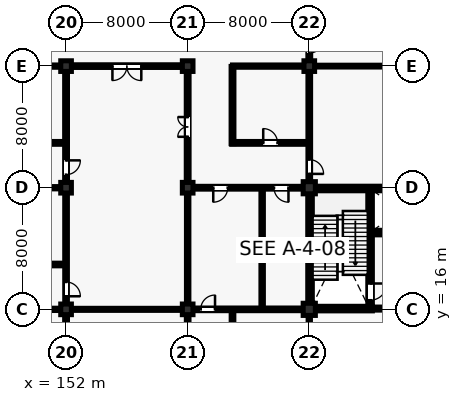
"""IFC4 building model, lengths in metres.
Left out: names, types, materials, properties, quantities, classifications, styles, units other than length and angle.
Written with IfcOpenShell. Run it as: python <this file> out.ifc"""

import sys

from ifc_helpers import new_model, si_unit, direction, frame, frame_2d, origin, origin_2d, place, context, subcontext, project, spatial, rectangle, extrude, element, fill, save


model = new_model("IFC4")
c1 = context("Model", 3, precision=1e-05, world=origin(), true_north=direction((0.0, 1.0)))
c2 = subcontext(c1, "Body", "Model", "MODEL_VIEW")
j1 = project(units=[si_unit("LENGTHUNIT", "METRE"), si_unit("PLANEANGLEUNIT", "RADIAN")], contexts=[c1])
p1 = place(None, origin())
s1 = spatial("IfcSite", under=j1, at=p1, CompositionType="ELEMENT")
p2 = place(p1, origin())
s2 = spatial("IfcBuilding", under=s1, at=p2, CompositionType="ELEMENT")
p3 = place(p2, origin())
s3 = spatial("IfcBuildingStorey", under=s2, at=p3, CompositionType="ELEMENT", Elevation=0.0)
for number, where, z_axis, x_axis in (
    (1, (152.0, 16.0, 0.0), (0.0, 0.0, 1.0), (1.0, 0.0, 0.0)),
    (2, (152.0, 24.0, 0.0), (0.0, 0.0, 1.0), (1.0, 0.0, 0.0)),
    (3, (152.0, 32.0, 0.0), (0.0, 0.0, 1.0), (1.0, 0.0, 0.0)),
    (4, (160.0, 16.0, 0.0), (0.0, 0.0, 1.0), (1.0, 0.0, 0.0)),
    (5, (160.0, 24.0, 0.0), (0.0, 0.0, 1.0), (1.0, 0.0, 0.0)),
    (6, (160.0, 32.0, 0.0), (0.0, 0.0, 1.0), (1.0, 0.0, 0.0)),
):
    element("IfcColumn", number, at=place(p3, frame(where, z_axis=z_axis, x_axis=x_axis)), inside=s3, PredefinedType="COLUMN", context=c2, shape_type="SweptSolid", body=[
        extrude(rectangle(XDim=0.7, YDim=0.7, at=origin_2d()), origin(), (0.0, 0.0, 1.0), 5.28),
    ])
for number, where, z_axis, x_axis in (
    (7, (168.0, 16.0, 0.0), (0.0, 0.0, 1.0), (1.0, 0.0, 0.0)),
    (8, (168.0, 24.0, 0.0), (0.0, 0.0, 1.0), (1.0, 0.0, 0.0)),
):
    element("IfcColumn", number, at=place(p3, frame(where, z_axis=z_axis, x_axis=x_axis)), inside=s3, PredefinedType="COLUMN", context=c2, shape_type="SweptSolid", body=[
        extrude(rectangle(XDim=0.8, YDim=0.8, at=origin_2d()), origin(), (0.0, 0.0, 1.0), 5.28),
    ])
p4 = place(p3, frame((168.0, 32.0, 0.0), z_axis=(0.0, 0.0, 1.0), x_axis=(1.0, 0.0, 0.0)))
e9 = element("IfcColumn", 9, at=p4, inside=s3, PredefinedType="COLUMN", context=c2, shape_type="SweptSolid", body=[
    extrude(rectangle(XDim=0.7, YDim=0.7, at=origin_2d()), origin(), (0.0, 0.0, 1.0), 5.28),
])
for number, where, z_axis, x_axis in (
    (10, (168.05, 16.29, 0.0), (0.0, 0.0, 1.0), (0.0, 1.0, 0.0)),
    (11, (168.29, 23.95, 0.0), (0.0, 0.0, 1.0), (1.0, 0.0, 0.0)),
):
    element("IfcWall", number, at=place(p3, frame(where, z_axis=z_axis, x_axis=x_axis)), inside=s3, PredefinedType="SHEAR", context=c2, shape_type="SweptSolid", body=[
        extrude(rectangle(XDim=7.42, YDim=0.3, at=frame_2d((3.71, 0.0))), origin(), (0.0, 0.0, 1.0), 5.035),
    ])
p5 = place(p3, frame((168.29, 16.05, 0.0), z_axis=(0.0, 0.0, 1.0), x_axis=(1.0, 0.0, 0.0)))
e12 = element("IfcWall", 12, at=p5, inside=s3, PredefinedType="SHEAR", context=c2, shape_type="SweptSolid", body=[
    extrude(rectangle(XDim=3.86, YDim=0.3, at=frame_2d((1.93, 0.0))), origin(), (0.0, 0.0, 1.0), 5.035),
])
p6 = place(p3, frame((172.0, 16.05, 0.0), z_axis=(0.0, 0.0, 1.0), x_axis=(0.0, 1.0, 0.0)))
e13 = element("IfcWall", 13, at=p6, inside=s3, PredefinedType="SHEAR", context=c2, shape_type="SweptSolid", body=[
    extrude(rectangle(XDim=7.9, YDim=0.3, at=frame_2d((3.95, 0.0))), origin(), (0.0, 0.0, 1.0), 5.035),
])
p7 = place(p6, frame((0.55, 0.0, 0.0)))
e14 = element("IfcOpeningElement", 14, at=p7, cuts=e13, PredefinedType="OPENING", context=c2, shape_type="SweptSolid", body=[
    extrude(rectangle(XDim=1.1, YDim=2.15, at=frame_2d((0.55, 1.075))), frame((0.0, 0.16, 0.0), z_axis=(0.0, -1.0, 0.0), x_axis=(1.0, 0.0, 0.0)), (0.0, 0.0, 1.0), 0.32),
])
p8 = place(p3, frame((172.0, 21.05, 0.0), z_axis=(0.0, 0.0, 1.0), x_axis=(1.0, 0.0, 0.0)))
e15 = element("IfcWall", 15, at=p8, inside=s3, PredefinedType="SHEAR", context=c2, shape_type="SweptSolid", body=[
    extrude(rectangle(XDim=3.95, YDim=0.3, at=frame_2d((1.975, 0.0))), origin(), (0.0, 0.0, 1.0), 5.035),
])
p9 = place(p8, frame((1.425, 0.0, 0.0)))
e16 = element("IfcOpeningElement", 16, at=p9, cuts=e15, PredefinedType="OPENING", context=c2, shape_type="SweptSolid", body=[
    extrude(rectangle(XDim=1.1, YDim=2.2, at=frame_2d((0.55, 1.1))), frame((0.0, 0.16, 0.0), z_axis=(0.0, -1.0, 0.0), x_axis=(1.0, 0.0, 0.0)), (0.0, 0.0, 1.0), 0.32),
])
p10 = place(p3, frame((172.0, 16.05, 0.0), z_axis=(0.0, 0.0, 1.0), x_axis=(1.0, 0.0, 0.0)))
e17 = element("IfcWall", 17, at=p10, inside=s3, PredefinedType="PARTITIONING", context=c2, shape_type="SweptSolid", body=[
    extrude(rectangle(XDim=3.61, YDim=0.2, at=frame_2d((1.805, 0.0))), origin(), (0.0, 0.0, 1.0), 4.404),
])
p11 = place(p10, frame((1.205, 0.0, 0.0)))
e18 = element("IfcOpeningElement", 18, at=p11, cuts=e17, PredefinedType="OPENING", context=c2, shape_type="SweptSolid", body=[
    extrude(rectangle(XDim=1.2, YDim=2.15, at=frame_2d((0.6, 1.075))), frame((0.0, 0.11, 0.0), z_axis=(0.0, -1.0, 0.0), x_axis=(1.0, 0.0, 0.0)), (0.0, 0.0, 1.0), 0.22),
])
p12 = place(p3, frame((146.95, 16.0, 0.0), z_axis=(0.0, 0.0, 1.0), x_axis=(1.0, 0.0, 0.0)))
e19 = element("IfcWall", 19, at=p12, inside=s3, PredefinedType="PARTITIONING", context=c2, shape_type="SweptSolid", body=[
    extrude(rectangle(XDim=4.69, YDim=0.15, at=frame_2d((2.345, 0.0))), origin(), (0.0, 0.0, 1.0), 4.603),
])
p13 = place(p3, frame((146.9, 18.95, 0.0), z_axis=(0.0, 0.0, 1.0), x_axis=(1.0, 0.0, 0.0)))
e20 = element("IfcWall", 20, at=p13, inside=s3, PredefinedType="PARTITIONING", context=c2, shape_type="SweptSolid", body=[
    extrude(rectangle(XDim=5.08, YDim=0.175, at=frame_2d((2.54, 0.0))), origin(), (0.0, 0.0, 1.0), 5.025),
])
p14 = place(p13, frame((1.915, 0.0, 0.0)))
e21 = element("IfcOpeningElement", 21, at=p14, cuts=e20, PredefinedType="OPENING", context=c2, shape_type="SweptSolid", body=[
    extrude(rectangle(XDim=1.25, YDim=2.18, at=frame_2d((0.625, 1.09))), frame((0.0, 0.097, 0.0), z_axis=(0.0, -1.0, 0.0), x_axis=(1.0, 0.0, 0.0)), (0.0, 0.0, 1.0), 0.195),
])
p15 = place(p3, frame((146.95, 24.0, 0.0), z_axis=(0.0, 0.0, 1.0), x_axis=(1.0, 0.0, 0.0)))
e22 = element("IfcWall", 22, at=p15, inside=s3, PredefinedType="PARTITIONING", context=c2, shape_type="SweptSolid", body=[
    extrude(rectangle(XDim=4.69, YDim=0.15, at=frame_2d((2.345, 0.0))), origin(), (0.0, 0.0, 1.0), 5.025),
])
p16 = place(p3, frame((146.9, 26.95, 0.0), z_axis=(0.0, 0.0, 1.0), x_axis=(1.0, 0.0, 0.0)))
e23 = element("IfcWall", 23, at=p16, inside=s3, PredefinedType="PARTITIONING", context=c2, shape_type="SweptSolid", body=[
    extrude(rectangle(XDim=5.08, YDim=0.185, at=frame_2d((2.54, 0.0))), origin(), (0.0, 0.0, 1.0), 5.025),
])
p17 = place(p16, frame((2.07, 0.0, 0.0)))
e24 = element("IfcOpeningElement", 24, at=p17, cuts=e23, PredefinedType="OPENING", context=c2, shape_type="SweptSolid", body=[
    extrude(rectangle(XDim=0.94, YDim=2.12, at=frame_2d((0.47, 1.06))), frame((0.0, 0.103, 0.0), z_axis=(0.0, -1.0, 0.0), x_axis=(1.0, 0.0, 0.0)), (0.0, 0.0, 1.0), 0.205),
])
p18 = place(p3, frame((146.95, 32.0, 0.0), z_axis=(0.0, 0.0, 1.0), x_axis=(1.0, 0.0, 0.0)))
e25 = element("IfcWall", 25, at=p18, inside=s3, PredefinedType="PARTITIONING", context=c2, shape_type="SweptSolid", body=[
    extrude(rectangle(XDim=4.69, YDim=0.15, at=frame_2d((2.345, 0.0))), origin(), (0.0, 0.0, 1.0), 4.607),
])
p19 = place(p3, frame((162.95, 10.9, 0.0), z_axis=(0.0, 0.0, 1.0), x_axis=(0.0, 1.0, 0.0)))
e26 = element("IfcWall", 26, at=p19, inside=s3, PredefinedType="PARTITIONING", context=c2, shape_type="SweptSolid", body=[
    extrude(rectangle(XDim=5.08, YDim=0.175, at=frame_2d((2.54, 0.0))), origin(), (0.0, 0.0, 1.0), 4.336),
])
p20 = place(p3, frame((168.0, 10.95, 0.0), z_axis=(0.0, 0.0, 1.0), x_axis=(0.0, 1.0, 0.0)))
e27 = element("IfcWall", 27, at=p20, inside=s3, PredefinedType="PARTITIONING", context=c2, shape_type="SweptSolid", body=[
    extrude(rectangle(XDim=4.64, YDim=0.15, at=frame_2d((2.32, 0.0))), origin(), (0.0, 0.0, 1.0), 4.404),
])
p21 = place(p3, frame((162.9, 26.95, 0.0), z_axis=(0.0, 0.0, 1.0), x_axis=(1.0, 0.0, 0.0)))
e28 = element("IfcWall", 28, at=p21, inside=s3, PredefinedType="PARTITIONING", context=c2, shape_type="SweptSolid", body=[
    extrude(rectangle(XDim=5.08, YDim=0.185, at=frame_2d((2.54, 0.0))), origin(), (0.0, 0.0, 1.0), 4.403),
])
p22 = place(p21, frame((2.07, 0.0, 0.0)))
e29 = element("IfcOpeningElement", 29, at=p22, cuts=e28, PredefinedType="OPENING", context=c2, shape_type="SweptSolid", body=[
    extrude(rectangle(XDim=0.94, YDim=2.12, at=frame_2d((0.47, 1.06))), frame((0.0, 0.103, 0.0), z_axis=(0.0, -1.0, 0.0), x_axis=(1.0, 0.0, 0.0)), (0.0, 0.0, 1.0), 0.205),
])
p23 = place(p3, frame((162.95, 26.9, 0.0), z_axis=(0.0, 0.0, 1.0), x_axis=(0.0, 1.0, 0.0)))
e30 = element("IfcWall", 30, at=p23, inside=s3, PredefinedType="PARTITIONING", context=c2, shape_type="SweptSolid", body=[
    extrude(rectangle(XDim=5.08, YDim=0.185, at=frame_2d((2.54, 0.0))), origin(), (0.0, 0.0, 1.0), 4.327),
])
p24 = place(p3, frame((162.95, 32.0, 0.0), z_axis=(0.0, 0.0, 1.0), x_axis=(1.0, 0.0, 0.0)))
e31 = element("IfcWall", 31, at=p24, inside=s3, PredefinedType="PARTITIONING", context=c2, shape_type="SweptSolid", body=[
    extrude(rectangle(XDim=4.69, YDim=0.15, at=frame_2d((2.345, 0.0))), origin(), (0.0, 0.0, 1.0), 4.327),
])
p25 = place(p3, frame((152.0, 8.34, 0.0), z_axis=(0.0, 0.0, 1.0), x_axis=(0.0, 1.0, 0.0)))
e32 = element("IfcWall", 32, at=p25, inside=s3, PredefinedType="PARTITIONING", context=c2, shape_type="SweptSolid", body=[
    extrude(rectangle(XDim=7.32, YDim=0.185, at=frame_2d((3.66, 0.0))), origin(), (0.0, 0.0, 1.0), 4.403),
])
p26 = place(p25, frame((0.52, 0.0, 0.0)))
e33 = element("IfcOpeningElement", 33, at=p26, cuts=e32, PredefinedType="OPENING", context=c2, shape_type="SweptSolid", body=[
    extrude(rectangle(XDim=0.94, YDim=2.12, at=frame_2d((0.47, 1.06))), frame((0.0, 0.103, 0.0), z_axis=(0.0, -1.0, 0.0), x_axis=(1.0, 0.0, 0.0)), (0.0, 0.0, 1.0), 0.205),
])
p27 = place(p3, frame((152.0, 16.34, 0.0), z_axis=(0.0, 0.0, 1.0), x_axis=(0.0, 1.0, 0.0)))
e34 = element("IfcWall", 34, at=p27, inside=s3, PredefinedType="PARTITIONING", context=c2, shape_type="SweptSolid", body=[
    extrude(rectangle(XDim=7.32, YDim=0.175, at=frame_2d((3.66, 0.0))), origin(), (0.0, 0.0, 1.0), 5.025),
])
p28 = place(p27, frame((0.52, 0.0, 0.0)))
e35 = element("IfcOpeningElement", 35, at=p28, cuts=e34, PredefinedType="OPENING", context=c2, shape_type="SweptSolid", body=[
    extrude(rectangle(XDim=0.94, YDim=2.12, at=frame_2d((0.47, 1.06))), frame((0.0, 0.097, 0.0), z_axis=(0.0, -1.0, 0.0), x_axis=(1.0, 0.0, 0.0)), (0.0, 0.0, 1.0), 0.195),
])
p29 = place(p3, frame((152.0, 24.34, 0.0), z_axis=(0.0, 0.0, 1.0), x_axis=(0.0, 1.0, 0.0)))
e36 = element("IfcWall", 36, at=p29, inside=s3, PredefinedType="PARTITIONING", context=c2, shape_type="SweptSolid", body=[
    extrude(rectangle(XDim=7.32, YDim=0.185, at=frame_2d((3.66, 0.0))), origin(), (0.0, 0.0, 1.0), 5.025),
])
p30 = place(p29, frame((0.52, 0.0, 0.0)))
e37 = element("IfcOpeningElement", 37, at=p30, cuts=e36, PredefinedType="OPENING", context=c2, shape_type="SweptSolid", body=[
    extrude(rectangle(XDim=0.94, YDim=2.12, at=frame_2d((0.47, 1.06))), frame((0.0, 0.103, 0.0), z_axis=(0.0, -1.0, 0.0), x_axis=(1.0, 0.0, 0.0)), (0.0, 0.0, 1.0), 0.205),
])
p31 = place(p3, frame((160.0, 8.34, 0.0), z_axis=(0.0, 0.0, 1.0), x_axis=(0.0, 1.0, 0.0)))
e38 = element("IfcWall", 38, at=p31, inside=s3, PredefinedType="PARTITIONING", context=c2, shape_type="SweptSolid", body=[
    extrude(rectangle(XDim=7.32, YDim=0.175, at=frame_2d((3.66, 0.0))), origin(), (0.0, 0.0, 1.0), 4.412),
])
p32 = place(p3, frame((152.34, 16.0, 0.0), z_axis=(0.0, 0.0, 1.0), x_axis=(1.0, 0.0, 0.0)))
e39 = element("IfcWall", 39, at=p32, inside=s3, PredefinedType="PARTITIONING", context=c2, shape_type="SweptSolid", body=[
    extrude(rectangle(XDim=7.32, YDim=0.135, at=frame_2d((3.66, 0.0))), origin(), (0.0, 0.0, 1.0), 4.667),
])
p33 = place(p3, frame((160.0, 16.34, 0.0), z_axis=(0.0, 0.0, 1.0), x_axis=(0.0, 1.0, 0.0)))
e40 = element("IfcWall", 40, at=p33, inside=s3, PredefinedType="PARTITIONING", context=c2, shape_type="SweptSolid", body=[
    extrude(rectangle(XDim=7.32, YDim=0.16, at=frame_2d((3.66, 0.0))), origin(), (0.0, 0.0, 1.0), 4.607),
])
p34 = place(p3, frame((160.0, 24.34, 0.0), z_axis=(0.0, 0.0, 1.0), x_axis=(0.0, 1.0, 0.0)))
e41 = element("IfcWall", 41, at=p34, inside=s3, PredefinedType="PARTITIONING", context=c2, shape_type="SweptSolid", body=[
    extrude(rectangle(XDim=7.32, YDim=0.185, at=frame_2d((3.66, 0.0))), origin(), (0.0, 0.0, 1.0), 4.67),
])
p35 = place(p34, frame((3.01, 0.0, 0.0)))
e42 = element("IfcOpeningElement", 42, at=p35, cuts=e41, PredefinedType="OPENING", context=c2, shape_type="SweptSolid", body=[
    extrude(rectangle(XDim=1.3, YDim=2.2, at=frame_2d((0.65, 1.1))), frame((0.0, 0.103, 0.0), z_axis=(0.0, -1.0, 0.0), x_axis=(1.0, 0.0, 0.0)), (0.0, 0.0, 1.0), 0.205),
])
p36 = place(p3, frame((152.34, 32.0, 0.0), z_axis=(0.0, 0.0, 1.0), x_axis=(1.0, 0.0, 0.0)))
e43 = element("IfcWall", 43, at=p36, inside=s3, PredefinedType="PARTITIONING", context=c2, shape_type="SweptSolid", body=[
    extrude(rectangle(XDim=7.32, YDim=0.175, at=frame_2d((3.66, 0.0))), origin(), (0.0, 0.0, 1.0), 4.67),
])
p37 = place(p36, frame((2.71, 0.0, 0.0)))
e44 = element("IfcOpeningElement", 44, at=p37, cuts=e43, PredefinedType="OPENING", context=c2, shape_type="SweptSolid", body=[
    extrude(rectangle(XDim=1.9, YDim=2.38, at=frame_2d((0.95, 1.19))), frame((0.0, 0.097, 0.0), z_axis=(0.0, -1.0, 0.0), x_axis=(1.0, 0.0, 0.0)), (0.0, 0.0, 1.0), 0.195),
])
p38 = place(p3, frame((160.34, 16.0, 0.0), z_axis=(0.0, 0.0, 1.0), x_axis=(1.0, 0.0, 0.0)))
e45 = element("IfcWall", 45, at=p38, inside=s3, PredefinedType="PARTITIONING", context=c2, shape_type="SweptSolid", body=[
    extrude(rectangle(XDim=7.27, YDim=0.175, at=frame_2d((3.635, 0.0))), origin(), (0.0, 0.0, 1.0), 4.336),
])
p39 = place(p38, frame((0.52, 0.0, 0.0)))
e46 = element("IfcOpeningElement", 46, at=p39, cuts=e45, PredefinedType="OPENING", context=c2, shape_type="SweptSolid", body=[
    extrude(rectangle(XDim=0.94, YDim=2.12, at=frame_2d((0.47, 1.06))), frame((0.0, 0.097, 0.0), z_axis=(0.0, -1.0, 0.0), x_axis=(1.0, 0.0, 0.0)), (0.0, 0.0, 1.0), 0.195),
])
p40 = place(p3, frame((160.34, 24.0, 0.0), z_axis=(0.0, 0.0, 1.0), x_axis=(1.0, 0.0, 0.0)))
e47 = element("IfcWall", 47, at=p40, inside=s3, PredefinedType="PARTITIONING", context=c2, shape_type="SweptSolid", body=[
    extrude(rectangle(XDim=7.27, YDim=0.185, at=frame_2d((3.635, 0.0))), origin(), (0.0, 0.0, 1.0), 4.404),
])
p41 = place(p40, frame((1.343, 0.0, 0.0)))
e48 = element("IfcOpeningElement", 48, at=p41, cuts=e47, PredefinedType="OPENING", context=c2, shape_type="SweptSolid", body=[
    extrude(rectangle(XDim=0.95, YDim=2.1, at=frame_2d((0.475, 1.05))), frame((0.0, 0.103, 0.0), z_axis=(0.0, -1.0, 0.0), x_axis=(1.0, 0.0, 0.0)), (0.0, 0.0, 1.0), 0.205),
])
p42 = place(p40, frame((5.341, 0.0, 0.0)))
e49 = element("IfcOpeningElement", 49, at=p42, cuts=e47, PredefinedType="OPENING", context=c2, shape_type="SweptSolid", body=[
    extrude(rectangle(XDim=0.95, YDim=2.1, at=frame_2d((0.475, 1.05))), frame((0.0, 0.103, 0.0), z_axis=(0.0, -1.0, 0.0), x_axis=(1.0, 0.0, 0.0)), (0.0, 0.0, 1.0), 0.205),
])
p43 = place(p3, frame((168.0, 24.39, 0.0), z_axis=(0.0, 0.0, 1.0), x_axis=(0.0, 1.0, 0.0)))
e50 = element("IfcWall", 50, at=p43, inside=s3, PredefinedType="PARTITIONING", context=c2, shape_type="SweptSolid", body=[
    extrude(rectangle(XDim=7.27, YDim=0.175, at=frame_2d((3.635, 0.0))), origin(), (0.0, 0.0, 1.0), 4.403),
])
p44 = place(p43, frame((0.52, 0.0, 0.0)))
e51 = element("IfcOpeningElement", 51, at=p44, cuts=e50, PredefinedType="OPENING", context=c2, shape_type="SweptSolid", body=[
    extrude(rectangle(XDim=0.94, YDim=2.12, at=frame_2d((0.47, 1.06))), frame((0.0, 0.097, 0.0), z_axis=(0.0, -1.0, 0.0), x_axis=(1.0, 0.0, 0.0)), (0.0, 0.0, 1.0), 0.195),
])
p45 = place(p3, frame((168.0, 32.34, 0.0), z_axis=(0.0, 0.0, 1.0), x_axis=(0.0, 1.0, 0.0)))
e52 = element("IfcWall", 52, at=p45, inside=s3, PredefinedType="PARTITIONING", context=c2, shape_type="SweptSolid", body=[
    extrude(rectangle(XDim=7.32, YDim=0.185, at=frame_2d((3.66, 0.0))), origin(), (0.0, 0.0, 1.0), 4.412),
])
p46 = place(p45, frame((0.52, 0.0, 0.0)))
e53 = element("IfcOpeningElement", 53, at=p46, cuts=e52, PredefinedType="OPENING", context=c2, shape_type="SweptSolid", body=[
    extrude(rectangle(XDim=0.94, YDim=2.12, at=frame_2d((0.47, 1.06))), frame((0.0, 0.103, 0.0), z_axis=(0.0, -1.0, 0.0), x_axis=(1.0, 0.0, 0.0)), (0.0, 0.0, 1.0), 0.205),
])
p47 = place(p3, frame((168.34, 32.0, 0.0), z_axis=(0.0, 0.0, 1.0), x_axis=(1.0, 0.0, 0.0)))
e54 = element("IfcWall", 54, at=p47, inside=s3, PredefinedType="PARTITIONING", context=c2, shape_type="SweptSolid", body=[
    extrude(rectangle(XDim=7.32, YDim=0.12, at=frame_2d((3.66, 0.0))), origin(), (0.0, 0.0, 1.0), 4.403),
])
p48 = place(p3, frame((164.9, 16.02, 0.0), z_axis=(0.0, 0.0, 1.0), x_axis=(0.0, 1.0, 0.0)))
e55 = element("IfcWall", 55, at=p48, inside=s3, PredefinedType="PARTITIONING", context=c2, shape_type="SweptSolid", body=[
    extrude(rectangle(XDim=7.96, YDim=0.16, at=frame_2d((3.98, 0.0))), origin(), (0.0, 0.0, 1.0), 4.336),
])
p49 = place(p7, frame((1.1, 0.0, 0.0), z_axis=(0.0, 0.0, 1.0), x_axis=(-1.0, 0.0, 0.0)))
e56 = element("IfcDoor", 56, at=p49, inside=s3, OperationType="SINGLE_SWING_RIGHT", PredefinedType="DOOR", context=c2, shape_type="SweptSolid", body=[
    extrude(rectangle(XDim=1.1, YDim=2.15, at=frame_2d((0.55, 1.075))), frame((0.0, 0.025, 0.0), z_axis=(0.0, -1.0, 0.0), x_axis=(1.0, 0.0, 0.0)), (0.0, 0.0, 1.0), 0.05),
])
fill(e14, e56)
p50 = place(p22, origin())
e57 = element("IfcDoor", 57, at=p50, inside=s3, OperationType="SINGLE_SWING_LEFT", PredefinedType="DOOR", context=c2, shape_type="SweptSolid", body=[
    extrude(rectangle(XDim=0.94, YDim=2.12, at=frame_2d((0.47, 1.06))), frame((0.0, 0.025, 0.0), z_axis=(0.0, -1.0, 0.0), x_axis=(1.0, 0.0, 0.0)), (0.0, 0.0, 1.0), 0.05),
])
fill(e29, e57)
p51 = place(p28, frame((0.94, 0.0, 0.0), z_axis=(0.0, 0.0, 1.0), x_axis=(-1.0, 0.0, 0.0)))
e58 = element("IfcDoor", 58, at=p51, inside=s3, OperationType="SINGLE_SWING_LEFT", PredefinedType="DOOR", context=c2, shape_type="SweptSolid", body=[
    extrude(rectangle(XDim=0.94, YDim=2.12, at=frame_2d((0.47, 1.06))), frame((0.0, 0.025, 0.0), z_axis=(0.0, -1.0, 0.0), x_axis=(1.0, 0.0, 0.0)), (0.0, 0.0, 1.0), 0.05),
])
fill(e35, e58)
p52 = place(p30, frame((0.94, 0.0, 0.0), z_axis=(0.0, 0.0, 1.0), x_axis=(-1.0, 0.0, 0.0)))
e59 = element("IfcDoor", 59, at=p52, inside=s3, OperationType="SINGLE_SWING_RIGHT", PredefinedType="DOOR", context=c2, shape_type="SweptSolid", body=[
    extrude(rectangle(XDim=0.94, YDim=2.12, at=frame_2d((0.47, 1.06))), frame((0.0, 0.025, 0.0), z_axis=(0.0, -1.0, 0.0), x_axis=(1.0, 0.0, 0.0)), (0.0, 0.0, 1.0), 0.05),
])
fill(e37, e59)
p53 = place(p35, origin())
e60 = element("IfcDoor", 60, at=p53, inside=s3, OperationType="DOUBLE_DOOR_SINGLE_SWING", PredefinedType="DOOR", context=c2, shape_type="SweptSolid", body=[
    extrude(rectangle(XDim=1.3, YDim=2.2, at=frame_2d((0.65, 1.1))), frame((0.0, 0.025, 0.0), z_axis=(0.0, -1.0, 0.0), x_axis=(1.0, 0.0, 0.0)), (0.0, 0.0, 1.0), 0.05),
])
fill(e42, e60)
p54 = place(p37, frame((1.9, 0.0, 0.0), z_axis=(0.0, 0.0, 1.0), x_axis=(-1.0, 0.0, 0.0)))
e61 = element("IfcDoor", 61, at=p54, inside=s3, OperationType="DOUBLE_DOOR_SINGLE_SWING", PredefinedType="DOOR", context=c2, shape_type="SweptSolid", body=[
    extrude(rectangle(XDim=1.9, YDim=2.38, at=frame_2d((0.95, 1.19))), frame((0.0, 0.025, 0.0), z_axis=(0.0, -1.0, 0.0), x_axis=(1.0, 0.0, 0.0)), (0.0, 0.0, 1.0), 0.05),
])
fill(e44, e61)
p55 = place(p39, origin())
e62 = element("IfcDoor", 62, at=p55, inside=s3, OperationType="SINGLE_SWING_RIGHT", PredefinedType="DOOR", context=c2, shape_type="SweptSolid", body=[
    extrude(rectangle(XDim=0.94, YDim=2.12, at=frame_2d((0.47, 1.06))), frame((0.0, 0.025, 0.0), z_axis=(0.0, -1.0, 0.0), x_axis=(1.0, 0.0, 0.0)), (0.0, 0.0, 1.0), 0.05),
])
fill(e46, e62)
p56 = place(p41, frame((0.95, 0.0, 0.0), z_axis=(0.0, 0.0, 1.0), x_axis=(-1.0, 0.0, 0.0)))
e63 = element("IfcDoor", 63, at=p56, inside=s3, OperationType="SINGLE_SWING_LEFT", PredefinedType="DOOR", context=c2, shape_type="SweptSolid", body=[
    extrude(rectangle(XDim=0.95, YDim=2.1, at=frame_2d((0.475, 1.05))), frame((0.0, 0.025, 0.0), z_axis=(0.0, -1.0, 0.0), x_axis=(1.0, 0.0, 0.0)), (0.0, 0.0, 1.0), 0.05),
])
fill(e48, e63)
p57 = place(p42, frame((0.95, 0.0, 0.0), z_axis=(0.0, 0.0, 1.0), x_axis=(-1.0, 0.0, 0.0)))
e64 = element("IfcDoor", 64, at=p57, inside=s3, OperationType="SINGLE_SWING_RIGHT", PredefinedType="DOOR", context=c2, shape_type="SweptSolid", body=[
    extrude(rectangle(XDim=0.95, YDim=2.1, at=frame_2d((0.475, 1.05))), frame((0.0, 0.025, 0.0), z_axis=(0.0, -1.0, 0.0), x_axis=(1.0, 0.0, 0.0)), (0.0, 0.0, 1.0), 0.05),
])
fill(e49, e64)
p58 = place(p44, frame((0.94, 0.0, 0.0), z_axis=(0.0, 0.0, 1.0), x_axis=(-1.0, 0.0, 0.0)))
e65 = element("IfcDoor", 65, at=p58, inside=s3, OperationType="SINGLE_SWING_LEFT", PredefinedType="DOOR", context=c2, shape_type="SweptSolid", body=[
    extrude(rectangle(XDim=0.94, YDim=2.12, at=frame_2d((0.47, 1.06))), frame((0.0, 0.025, 0.0), z_axis=(0.0, -1.0, 0.0), x_axis=(1.0, 0.0, 0.0)), (0.0, 0.0, 1.0), 0.05),
])
fill(e51, e65)
p59 = place(p46, frame((0.94, 0.0, 0.0), z_axis=(0.0, 0.0, 1.0), x_axis=(-1.0, 0.0, 0.0)))
e66 = element("IfcDoor", 66, at=p59, inside=s3, OperationType="SINGLE_SWING_RIGHT", PredefinedType="DOOR", context=c2, shape_type="SweptSolid", body=[
    extrude(rectangle(XDim=0.94, YDim=2.12, at=frame_2d((0.47, 1.06))), frame((0.0, 0.025, 0.0), z_axis=(0.0, -1.0, 0.0), x_axis=(1.0, 0.0, 0.0)), (0.0, 0.0, 1.0), 0.05),
])
fill(e53, e66)
save(model, sys.argv[1])
